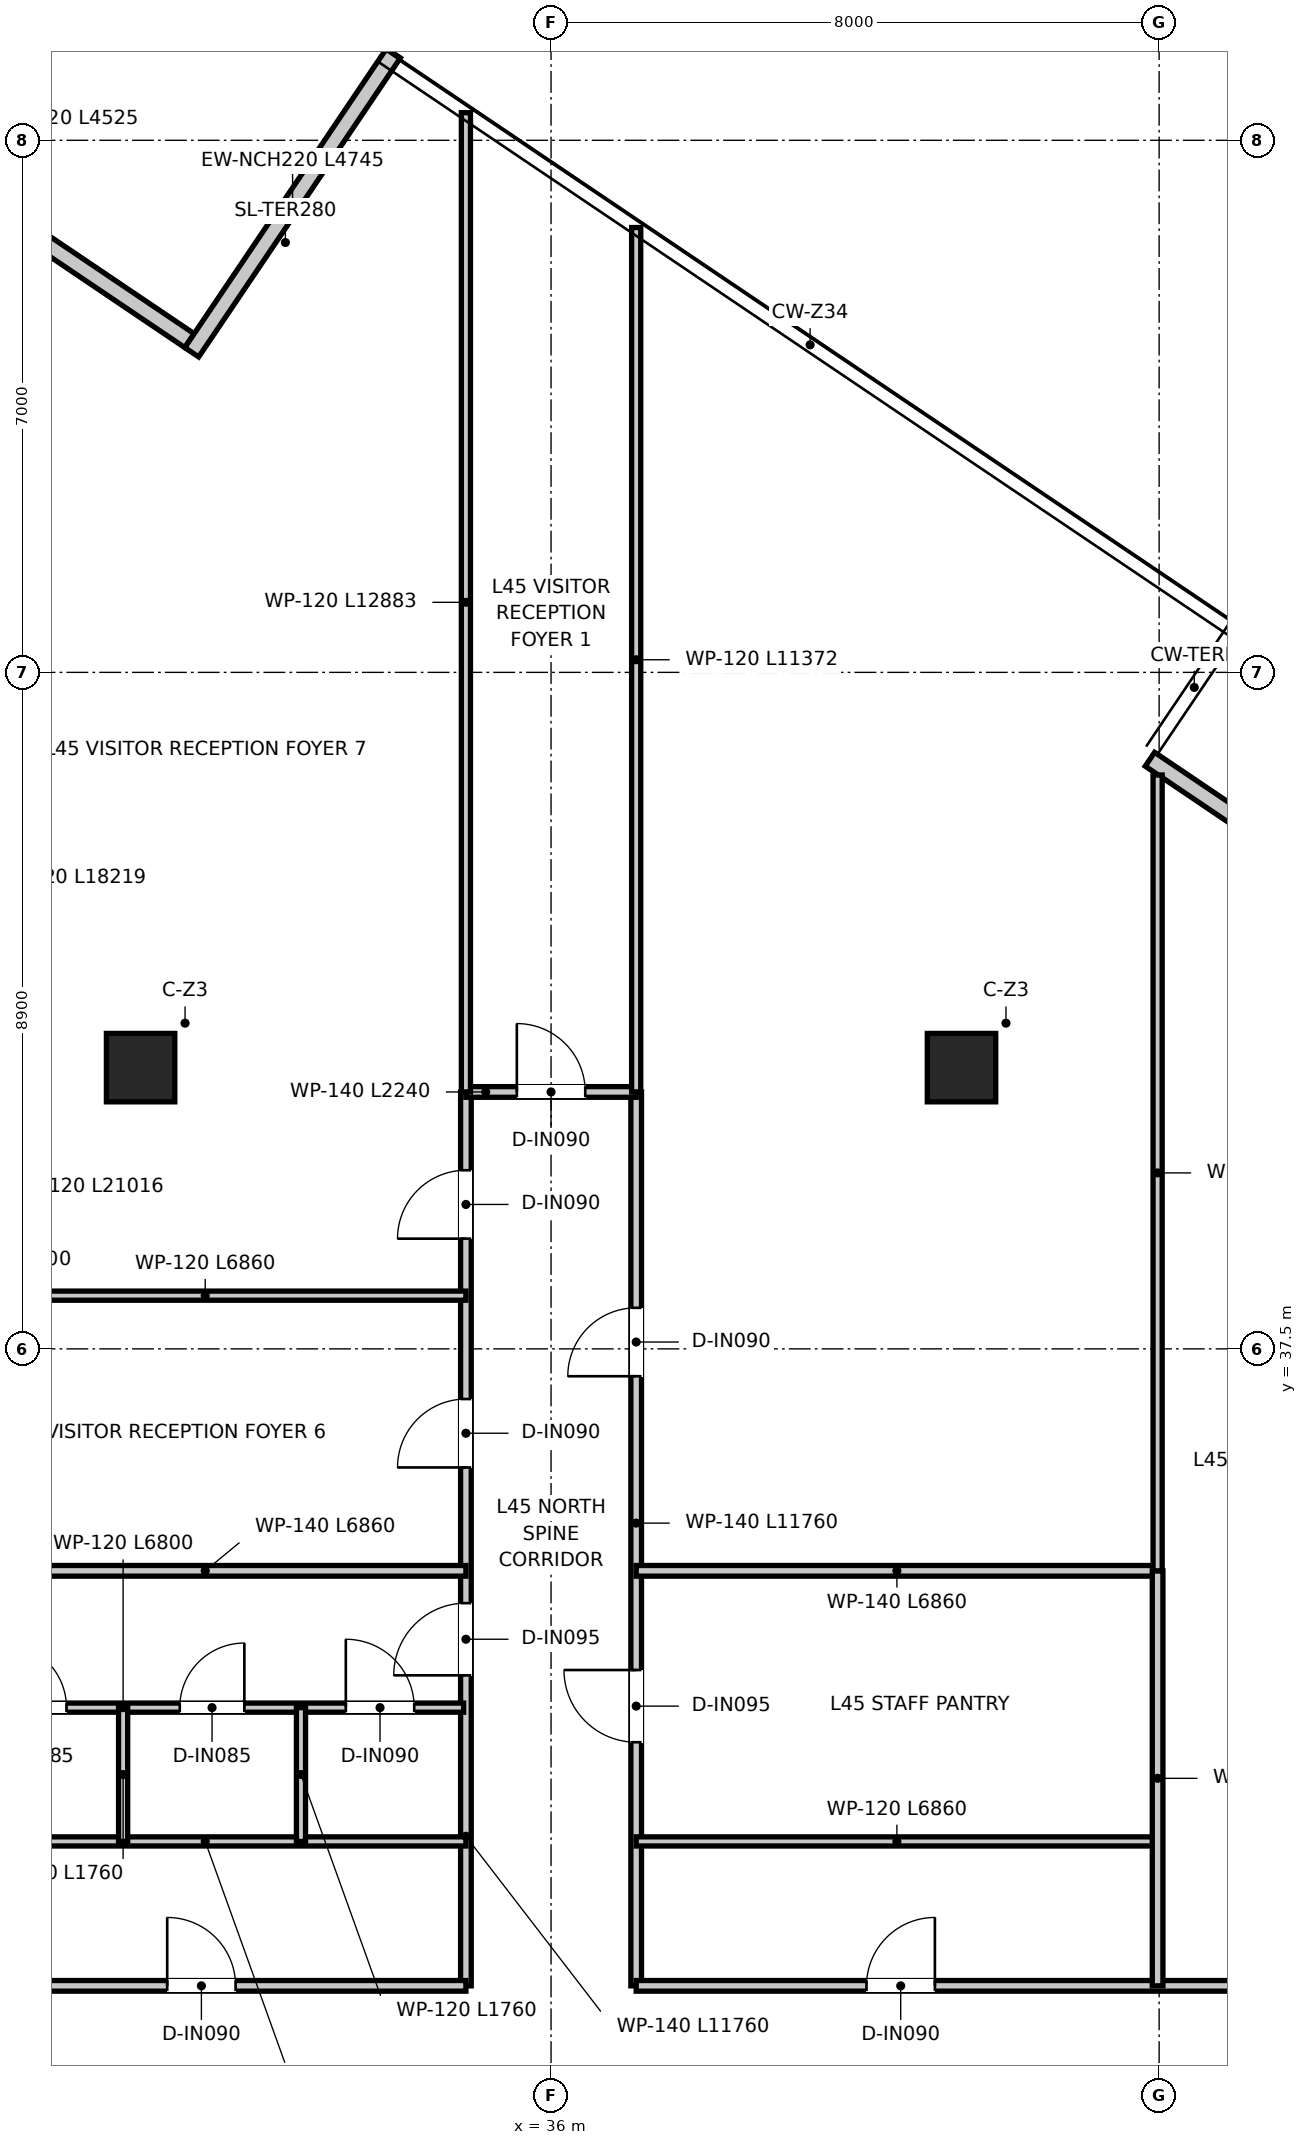
"""IFC4 building model, lengths in metres.
Left out: names, types, materials, properties, quantities, classifications, styles, units other than length and angle.
Written with IfcOpenShell. Run it as: python <this file> out.ifc"""

import sys

from ifc_helpers import new_model, si_unit, direction, frame, frame_2d, origin, origin_2d, place, context, subcontext, project, spatial, rectangle, extrude, source, transform, mapped, element, fill, save


model = new_model("IFC4")
c1 = context("Model", 3, precision=1e-05, world=origin(), true_north=direction((0.0, 1.0)))
c2 = subcontext(c1, "Body", "Model", "MODEL_VIEW")
j1 = project(units=[si_unit("LENGTHUNIT", "METRE"), si_unit("PLANEANGLEUNIT", "RADIAN")], contexts=[c1])
p1 = place(None, origin())
s1 = spatial("IfcSite", under=j1, at=p1, CompositionType="ELEMENT")
p2 = place(p1, origin())
s2 = spatial("IfcBuilding", under=s1, at=p2, CompositionType="ELEMENT")
p3 = place(p2, frame((0.0, 0.0, 185.7)))
s3 = spatial("IfcBuildingStorey", under=s2, at=p3, CompositionType="ELEMENT", Elevation=185.7)
m1 = source(origin(), c2, "Body", "SweptSolid", [
    extrude(rectangle(XDim=0.9, YDim=0.9, at=origin_2d()), origin(), (0.0, 0.0, 1.0), 3.95),
])
for number, where, z_axis, x_axis in (
    (1, (30.6, 41.2, 0.0), (0.0, 0.0, 1.0), (1.0, 0.0, 0.0)),
    (2, (41.4, 41.2, 0.0), (0.0, 0.0, 1.0), (1.0, 0.0, 0.0)),
):
    element("IfcColumn", number, at=place(p3, frame(where, z_axis=z_axis, x_axis=x_axis)), inside=s3, PredefinedType="COLUMN", context=c2, shape_type="MappedRepresentation", body=[
        mapped(m1, transform((0.0, 0.0, 0.0), x_axis=(1.0, 0.0, 0.0), y_axis=(0.0, 1.0, 0.0), z_axis=(0.0, 0.0, 1.0), scale=1.0)),
    ])
p4 = place(p3, frame((31.243, 50.764, 0.0), z_axis=(0.0, 0.0, 1.0), x_axis=(-0.829025013232, 0.559211522982, 0.0)))
e3 = element("IfcWall", 3, at=p4, inside=s3, PredefinedType="ELEMENTEDWALL", context=c2, shape_type="SweptSolid", body=[
    extrude(rectangle(XDim=4.525, YDim=0.22, at=frame_2d((2.263, 0.0))), origin(), (0.0, 0.0, 1.0), 3.67),
])
p5 = place(p3, frame((43.879, 45.257, 0.0), z_axis=(0.0, 0.0, 1.0), x_axis=(0.829039271094, -0.559190385274, 0.0)))
e4 = element("IfcWall", 4, at=p5, inside=s3, PredefinedType="ELEMENTEDWALL", context=c2, shape_type="SweptSolid", body=[
    extrude(rectangle(XDim=7.69, YDim=0.22, at=frame_2d((3.845, 0.0))), origin(), (0.0, 0.0, 1.0), 3.67),
])
p6 = place(p5, frame((2.397, 0.0, 0.0)))
e5 = element("IfcOpeningElement", 5, at=p6, cuts=e4, PredefinedType="OPENING", context=c2, shape_type="SweptSolid", body=[
    extrude(rectangle(XDim=0.95, YDim=2.1, at=frame_2d((0.475, 1.05))), frame((0.0, 0.12, 0.0), z_axis=(0.0, -1.0, 0.0), x_axis=(1.0, 0.0, 0.0)), (0.0, 0.0, 1.0), 0.24),
])
p7 = place(p3, frame((33.926, 54.545, 0.0), z_axis=(0.0, 0.0, 1.0), x_axis=(-0.559180323614, -0.829046057637, 0.0)))
e6 = element("IfcWall", 6, at=p7, inside=s3, PredefinedType="ELEMENTEDWALL", context=c2, shape_type="SweptSolid", body=[
    extrude(rectangle(XDim=4.745, YDim=0.22, at=frame_2d((2.373, 0.0))), origin(), (0.0, 0.0, 1.0), 3.67),
])
p8 = place(p3, frame((34.88, 29.12, 0.0), z_axis=(0.0, 0.0, 1.0), x_axis=(0.0, 1.0, 0.0)))
e7 = element("IfcWall", 7, at=p8, inside=s3, PredefinedType="PARTITIONING", context=c2, shape_type="SweptSolid", body=[
    extrude(rectangle(XDim=11.76, YDim=0.14, at=frame_2d((5.88, 0.0))), origin(), (0.0, 0.0, 1.0), 3.03),
])
p9 = place(p8, frame((4.085, 0.0, 0.0)))
e8 = element("IfcOpeningElement", 8, at=p9, cuts=e7, PredefinedType="OPENING", context=c2, shape_type="SweptSolid", body=[
    extrude(rectangle(XDim=0.95, YDim=2.1, at=frame_2d((0.475, 1.05))), frame((0.0, 0.08, 0.0), z_axis=(0.0, -1.0, 0.0), x_axis=(1.0, 0.0, 0.0)), (0.0, 0.0, 1.0), 0.16),
])
p10 = place(p8, frame((6.82, 0.0, 0.0)))
e9 = element("IfcOpeningElement", 9, at=p10, cuts=e7, PredefinedType="OPENING", context=c2, shape_type="SweptSolid", body=[
    extrude(rectangle(XDim=0.9, YDim=2.1, at=frame_2d((0.45, 1.05))), frame((0.0, 0.08, 0.0), z_axis=(0.0, -1.0, 0.0), x_axis=(1.0, 0.0, 0.0)), (0.0, 0.0, 1.0), 0.16),
])
p11 = place(p8, frame((9.83, 0.0, 0.0)))
e10 = element("IfcOpeningElement", 10, at=p11, cuts=e7, PredefinedType="OPENING", context=c2, shape_type="SweptSolid", body=[
    extrude(rectangle(XDim=0.9, YDim=2.1, at=frame_2d((0.45, 1.05))), frame((0.0, 0.08, 0.0), z_axis=(0.0, -1.0, 0.0), x_axis=(1.0, 0.0, 0.0)), (0.0, 0.0, 1.0), 0.16),
])
p12 = place(p3, frame((37.12, 29.12, 0.0), z_axis=(0.0, 0.0, 1.0), x_axis=(0.0, 1.0, 0.0)))
e11 = element("IfcWall", 11, at=p12, inside=s3, PredefinedType="PARTITIONING", context=c2, shape_type="SweptSolid", body=[
    extrude(rectangle(XDim=11.76, YDim=0.14, at=frame_2d((5.88, 0.0))), origin(), (0.0, 0.0, 1.0), 3.03),
])
p13 = place(p12, frame((3.205, 0.0, 0.0)))
e12 = element("IfcOpeningElement", 12, at=p13, cuts=e11, PredefinedType="OPENING", context=c2, shape_type="SweptSolid", body=[
    extrude(rectangle(XDim=0.95, YDim=2.1, at=frame_2d((0.475, 1.05))), frame((0.0, 0.08, 0.0), z_axis=(0.0, -1.0, 0.0), x_axis=(1.0, 0.0, 0.0)), (0.0, 0.0, 1.0), 0.16),
])
p14 = place(p12, frame((8.02, 0.0, 0.0)))
e13 = element("IfcOpeningElement", 13, at=p14, cuts=e11, PredefinedType="OPENING", context=c2, shape_type="SweptSolid", body=[
    extrude(rectangle(XDim=0.9, YDim=2.1, at=frame_2d((0.45, 1.05))), frame((0.0, 0.08, 0.0), z_axis=(0.0, -1.0, 0.0), x_axis=(1.0, 0.0, 0.0)), (0.0, 0.0, 1.0), 0.16),
])
p15 = place(p3, frame((34.88, 40.88, 0.0), z_axis=(0.0, 0.0, 1.0), x_axis=(1.0, 0.0, 0.0)))
e14 = element("IfcWall", 14, at=p15, inside=s3, PredefinedType="PARTITIONING", context=c2, shape_type="SweptSolid", body=[
    extrude(rectangle(XDim=2.24, YDim=0.14, at=frame_2d((1.12, 0.0))), origin(), (0.0, 0.0, 1.0), 3.67),
])
p16 = place(p15, frame((0.67, 0.0, 0.0)))
e15 = element("IfcOpeningElement", 15, at=p16, cuts=e14, PredefinedType="OPENING", context=c2, shape_type="SweptSolid", body=[
    extrude(rectangle(XDim=0.9, YDim=2.1, at=frame_2d((0.45, 1.05))), frame((0.0, 0.08, 0.0), z_axis=(0.0, -1.0, 0.0), x_axis=(1.0, 0.0, 0.0)), (0.0, 0.0, 1.0), 0.16),
])
p17 = place(p3, frame((11.325, 29.12, 0.0), z_axis=(0.0, 0.0, 1.0), x_axis=(1.0, 0.0, 0.0)))
e16 = element("IfcWall", 16, at=p17, inside=s3, PredefinedType="PARTITIONING", context=c2, shape_type="SweptSolid", body=[
    extrude(rectangle(XDim=23.555, YDim=0.14, at=frame_2d((11.778, 0.0))), origin(), (0.0, 0.0, 1.0), 3.03),
])
p18 = place(p17, frame((19.625, 0.0, 0.0)))
e17 = element("IfcOpeningElement", 17, at=p18, cuts=e16, PredefinedType="OPENING", context=c2, shape_type="SweptSolid", body=[
    extrude(rectangle(XDim=0.9, YDim=2.1, at=frame_2d((0.45, 1.05))), frame((0.0, 0.08, 0.0), z_axis=(0.0, -1.0, 0.0), x_axis=(1.0, 0.0, 0.0)), (0.0, 0.0, 1.0), 0.16),
])
p19 = place(p17, frame((2.835, 0.0, 0.0)))
e18 = element("IfcOpeningElement", 18, at=p19, cuts=e16, PredefinedType="OPENING", context=c2, shape_type="SweptSolid", body=[
    extrude(rectangle(XDim=0.9, YDim=2.1, at=frame_2d((0.45, 1.05))), frame((0.0, 0.08, 0.0), z_axis=(0.0, -1.0, 0.0), x_axis=(1.0, 0.0, 0.0)), (0.0, 0.0, 1.0), 0.16),
])
p20 = place(p17, frame((9.725, 0.0, 0.0)))
e19 = element("IfcOpeningElement", 19, at=p20, cuts=e16, PredefinedType="OPENING", context=c2, shape_type="SweptSolid", body=[
    extrude(rectangle(XDim=0.9, YDim=2.1, at=frame_2d((0.45, 1.05))), frame((0.0, 0.08, 0.0), z_axis=(0.0, -1.0, 0.0), x_axis=(1.0, 0.0, 0.0)), (0.0, 0.0, 1.0), 0.16),
])
p21 = place(p17, frame((12.475, 0.0, 0.0)))
e20 = element("IfcOpeningElement", 20, at=p21, cuts=e16, PredefinedType="OPENING", context=c2, shape_type="SweptSolid", body=[
    extrude(rectangle(XDim=0.9, YDim=2.1, at=frame_2d((0.45, 1.05))), frame((0.0, 0.08, 0.0), z_axis=(0.0, -1.0, 0.0), x_axis=(1.0, 0.0, 0.0)), (0.0, 0.0, 1.0), 0.16),
])
p22 = place(p17, frame((14.775, 0.0, 0.0)))
e21 = element("IfcOpeningElement", 21, at=p22, cuts=e16, PredefinedType="OPENING", context=c2, shape_type="SweptSolid", body=[
    extrude(rectangle(XDim=0.9, YDim=2.1, at=frame_2d((0.45, 1.05))), frame((0.0, 0.08, 0.0), z_axis=(0.0, -1.0, 0.0), x_axis=(1.0, 0.0, 0.0)), (0.0, 0.0, 1.0), 0.16),
])
p23 = place(p3, frame((37.12, 29.12, 0.0), z_axis=(0.0, 0.0, 1.0), x_axis=(1.0, 0.0, 0.0)))
e22 = element("IfcWall", 22, at=p23, inside=s3, PredefinedType="PARTITIONING", context=c2, shape_type="SweptSolid", body=[
    extrude(rectangle(XDim=26.006, YDim=0.14, at=frame_2d((13.003, 0.0))), origin(), (0.0, 0.0, 1.0), 3.03),
])
p24 = place(p23, frame((3.03, 0.0, 0.0)))
e23 = element("IfcOpeningElement", 23, at=p24, cuts=e22, PredefinedType="OPENING", context=c2, shape_type="SweptSolid", body=[
    extrude(rectangle(XDim=0.9, YDim=2.1, at=frame_2d((0.45, 1.05))), frame((0.0, 0.08, 0.0), z_axis=(0.0, -1.0, 0.0), x_axis=(1.0, 0.0, 0.0)), (0.0, 0.0, 1.0), 0.16),
])
p25 = place(p23, frame((8.42, 0.0, 0.0)))
e24 = element("IfcOpeningElement", 24, at=p25, cuts=e22, PredefinedType="OPENING", context=c2, shape_type="SweptSolid", body=[
    extrude(rectangle(XDim=0.9, YDim=2.1, at=frame_2d((0.45, 1.05))), frame((0.0, 0.08, 0.0), z_axis=(0.0, -1.0, 0.0), x_axis=(1.0, 0.0, 0.0)), (0.0, 0.0, 1.0), 0.16),
])
p26 = place(p23, frame((11.93, 0.0, 0.0)))
e25 = element("IfcOpeningElement", 25, at=p26, cuts=e22, PredefinedType="OPENING", context=c2, shape_type="SweptSolid", body=[
    extrude(rectangle(XDim=0.9, YDim=2.1, at=frame_2d((0.45, 1.05))), frame((0.0, 0.08, 0.0), z_axis=(0.0, -1.0, 0.0), x_axis=(1.0, 0.0, 0.0)), (0.0, 0.0, 1.0), 0.16),
])
p27 = place(p23, frame((19.32, 0.0, 0.0)))
e26 = element("IfcOpeningElement", 26, at=p27, cuts=e22, PredefinedType="OPENING", context=c2, shape_type="SweptSolid", body=[
    extrude(rectangle(XDim=0.9, YDim=2.1, at=frame_2d((0.45, 1.05))), frame((0.0, 0.08, 0.0), z_axis=(0.0, -1.0, 0.0), x_axis=(1.0, 0.0, 0.0)), (0.0, 0.0, 1.0), 0.16),
])
for number, where, z_axis, x_axis in (
    (27, (28.02, 31.02, 0.0), (0.0, 0.0, 1.0), (1.0, 0.0, 0.0)),
    (28, (37.12, 31.02, 0.0), (0.0, 0.0, 1.0), (1.0, 0.0, 0.0)),
):
    element("IfcWall", number, at=place(p3, frame(where, z_axis=z_axis, x_axis=x_axis)), inside=s3, PredefinedType="PARTITIONING", context=c2, shape_type="SweptSolid", body=[
        extrude(rectangle(XDim=6.86, YDim=0.12, at=frame_2d((3.43, 0.0))), origin(), (0.0, 0.0, 1.0), 3.08),
    ])
for number, where, z_axis, x_axis in (
    (29, (28.02, 34.58, 0.0), (0.0, 0.0, 1.0), (1.0, 0.0, 0.0)),
    (30, (37.12, 34.58, 0.0), (0.0, 0.0, 1.0), (1.0, 0.0, 0.0)),
):
    element("IfcWall", number, at=place(p3, frame(where, z_axis=z_axis, x_axis=x_axis)), inside=s3, PredefinedType="PARTITIONING", context=c2, shape_type="SweptSolid", body=[
        extrude(rectangle(XDim=6.86, YDim=0.14, at=frame_2d((3.43, 0.0))), origin(), (0.0, 0.0, 1.0), 3.08),
    ])
p28 = place(p3, frame((43.98, 29.12, 0.0), z_axis=(0.0, 0.0, 1.0), x_axis=(0.0, 1.0, 0.0)))
e31 = element("IfcWall", 31, at=p28, inside=s3, PredefinedType="PARTITIONING", context=c2, shape_type="SweptSolid", body=[
    extrude(rectangle(XDim=5.46, YDim=0.14, at=frame_2d((2.73, 0.0))), origin(), (0.0, 0.0, 1.0), 3.31),
])
p29 = place(p3, frame((28.05, 32.78, 0.0), z_axis=(0.0, 0.0, 1.0), x_axis=(1.0, 0.0, 0.0)))
e32 = element("IfcWall", 32, at=p29, inside=s3, PredefinedType="PARTITIONING", context=c2, shape_type="SweptSolid", body=[
    extrude(rectangle(XDim=6.8, YDim=0.12, at=frame_2d((3.4, 0.0))), origin(), (0.0, 0.0, 1.0), 3.08),
])
p30 = place(p29, frame((0.725, 0.0, 0.0)))
e33 = element("IfcOpeningElement", 33, at=p30, cuts=e32, PredefinedType="OPENING", context=c2, shape_type="SweptSolid", body=[
    extrude(rectangle(XDim=0.85, YDim=2.1, at=frame_2d((0.425, 1.05))), frame((0.0, 0.07, 0.0), z_axis=(0.0, -1.0, 0.0), x_axis=(1.0, 0.0, 0.0)), (0.0, 0.0, 1.0), 0.14),
])
p31 = place(p29, frame((3.065, 0.0, 0.0)))
e34 = element("IfcOpeningElement", 34, at=p31, cuts=e32, PredefinedType="OPENING", context=c2, shape_type="SweptSolid", body=[
    extrude(rectangle(XDim=0.85, YDim=2.1, at=frame_2d((0.425, 1.05))), frame((0.0, 0.07, 0.0), z_axis=(0.0, -1.0, 0.0), x_axis=(1.0, 0.0, 0.0)), (0.0, 0.0, 1.0), 0.14),
])
p32 = place(p29, frame((5.25, 0.0, 0.0)))
e35 = element("IfcOpeningElement", 35, at=p32, cuts=e32, PredefinedType="OPENING", context=c2, shape_type="SweptSolid", body=[
    extrude(rectangle(XDim=0.9, YDim=2.1, at=frame_2d((0.45, 1.05))), frame((0.0, 0.07, 0.0), z_axis=(0.0, -1.0, 0.0), x_axis=(1.0, 0.0, 0.0)), (0.0, 0.0, 1.0), 0.14),
])
p33 = place(p3, frame((30.37, 31.02, 0.0), z_axis=(0.0, 0.0, 1.0), x_axis=(0.0, 1.0, 0.0)))
e36 = element("IfcWall", 36, at=p33, inside=s3, PredefinedType="PARTITIONING", context=c2, shape_type="SweptSolid", body=[
    extrude(rectangle(XDim=1.76, YDim=0.12, at=frame_2d((0.88, 0.0))), origin(), (0.0, 0.0, 1.0), 3.08),
])
p34 = place(p3, frame((32.71, 31.02, 0.0), z_axis=(0.0, 0.0, 1.0), x_axis=(0.0, 1.0, 0.0)))
e37 = element("IfcWall", 37, at=p34, inside=s3, PredefinedType="PARTITIONING", context=c2, shape_type="SweptSolid", body=[
    extrude(rectangle(XDim=1.76, YDim=0.12, at=frame_2d((0.88, 0.0))), origin(), (0.0, 0.0, 1.0), 3.67),
])
p35 = place(p3, frame((34.88, 40.88, 0.0), z_axis=(0.0, 0.0, 1.0), x_axis=(0.0, 1.0, 0.0)))
e38 = element("IfcWall", 38, at=p35, inside=s3, PredefinedType="PARTITIONING", context=c2, shape_type="SweptSolid", body=[
    extrude(rectangle(XDim=12.883, YDim=0.12, at=frame_2d((6.442, 0.0))), origin(), (0.0, 0.0, 1.0), 3.28),
])
p36 = place(p3, frame((37.12, 40.88, 0.0), z_axis=(0.0, 0.0, 1.0), x_axis=(0.0, 1.0, 0.0)))
e39 = element("IfcWall", 39, at=p36, inside=s3, PredefinedType="PARTITIONING", context=c2, shape_type="SweptSolid", body=[
    extrude(rectangle(XDim=11.372, YDim=0.12, at=frame_2d((5.686, 0.0))), origin(), (0.0, 0.0, 1.0), 3.28),
])
p37 = place(p3, frame((43.98, 34.58, 0.0), z_axis=(0.0, 0.0, 1.0), x_axis=(0.0, 1.0, 0.0)))
e40 = element("IfcWall", 40, at=p37, inside=s3, PredefinedType="PARTITIONING", context=c2, shape_type="SweptSolid", body=[
    extrude(rectangle(XDim=10.47, YDim=0.12, at=frame_2d((5.235, 0.0))), origin(), (0.0, 0.0, 1.0), 3.03),
])
p38 = place(p3, frame((28.02, 38.2, 0.0), z_axis=(0.0, 0.0, 1.0), x_axis=(1.0, 0.0, 0.0)))
e41 = element("IfcWall", 41, at=p38, inside=s3, PredefinedType="PARTITIONING", context=c2, shape_type="SweptSolid", body=[
    extrude(rectangle(XDim=6.86, YDim=0.12, at=frame_2d((3.43, 0.0))), origin(), (0.0, 0.0, 1.0), 3.08),
])
p39 = place(p18, origin())
e42 = element("IfcDoor", 42, at=p39, inside=s3, OperationType="SINGLE_SWING_LEFT", PredefinedType="DOOR", context=c2, shape_type="SweptSolid", body=[
    extrude(rectangle(XDim=0.9, YDim=2.1, at=frame_2d((0.45, 1.05))), frame((0.0, 0.025, 0.0), z_axis=(0.0, -1.0, 0.0), x_axis=(1.0, 0.0, 0.0)), (0.0, 0.0, 1.0), 0.05),
])
fill(e17, e42)
p40 = place(p24, origin())
e43 = element("IfcDoor", 43, at=p40, inside=s3, OperationType="SINGLE_SWING_RIGHT", PredefinedType="DOOR", context=c2, shape_type="SweptSolid", body=[
    extrude(rectangle(XDim=0.9, YDim=2.1, at=frame_2d((0.45, 1.05))), frame((0.0, 0.025, 0.0), z_axis=(0.0, -1.0, 0.0), x_axis=(1.0, 0.0, 0.0)), (0.0, 0.0, 1.0), 0.05),
])
fill(e23, e43)
p41 = place(p9, origin())
e44 = element("IfcDoor", 44, at=p41, inside=s3, OperationType="SINGLE_SWING_LEFT", PredefinedType="DOOR", context=c2, shape_type="SweptSolid", body=[
    extrude(rectangle(XDim=0.95, YDim=2.1, at=frame_2d((0.475, 1.05))), frame((0.0, 0.025, 0.0), z_axis=(0.0, -1.0, 0.0), x_axis=(1.0, 0.0, 0.0)), (0.0, 0.0, 1.0), 0.05),
])
fill(e8, e44)
p42 = place(p13, origin())
e45 = element("IfcDoor", 45, at=p42, inside=s3, OperationType="SINGLE_SWING_RIGHT", PredefinedType="DOOR", context=c2, shape_type="SweptSolid", body=[
    extrude(rectangle(XDim=0.95, YDim=2.1, at=frame_2d((0.475, 1.05))), frame((0.0, 0.025, 0.0), z_axis=(0.0, -1.0, 0.0), x_axis=(1.0, 0.0, 0.0)), (0.0, 0.0, 1.0), 0.05),
])
fill(e12, e45)
p43 = place(p30, origin())
e46 = element("IfcDoor", 46, at=p43, inside=s3, OperationType="SINGLE_SWING_LEFT", PredefinedType="DOOR", context=c2, shape_type="SweptSolid", body=[
    extrude(rectangle(XDim=0.85, YDim=2.1, at=frame_2d((0.425, 1.05))), frame((0.0, 0.025, 0.0), z_axis=(0.0, -1.0, 0.0), x_axis=(1.0, 0.0, 0.0)), (0.0, 0.0, 1.0), 0.05),
])
fill(e33, e46)
p44 = place(p31, origin())
e47 = element("IfcDoor", 47, at=p44, inside=s3, OperationType="SINGLE_SWING_RIGHT", PredefinedType="DOOR", context=c2, shape_type="SweptSolid", body=[
    extrude(rectangle(XDim=0.85, YDim=2.1, at=frame_2d((0.425, 1.05))), frame((0.0, 0.025, 0.0), z_axis=(0.0, -1.0, 0.0), x_axis=(1.0, 0.0, 0.0)), (0.0, 0.0, 1.0), 0.05),
])
fill(e34, e47)
p45 = place(p32, origin())
e48 = element("IfcDoor", 48, at=p45, inside=s3, OperationType="SINGLE_SWING_LEFT", PredefinedType="DOOR", context=c2, shape_type="SweptSolid", body=[
    extrude(rectangle(XDim=0.9, YDim=2.1, at=frame_2d((0.45, 1.05))), frame((0.0, 0.025, 0.0), z_axis=(0.0, -1.0, 0.0), x_axis=(1.0, 0.0, 0.0)), (0.0, 0.0, 1.0), 0.05),
])
fill(e35, e48)
p46 = place(p16, origin())
e49 = element("IfcDoor", 49, at=p46, inside=s3, OperationType="SINGLE_SWING_LEFT", PredefinedType="DOOR", context=c2, shape_type="SweptSolid", body=[
    extrude(rectangle(XDim=0.9, YDim=2.1, at=frame_2d((0.45, 1.05))), frame((0.0, 0.025, 0.0), z_axis=(0.0, -1.0, 0.0), x_axis=(1.0, 0.0, 0.0)), (0.0, 0.0, 1.0), 0.05),
])
fill(e15, e49)
p47 = place(p10, origin())
e50 = element("IfcDoor", 50, at=p47, inside=s3, OperationType="SINGLE_SWING_LEFT", PredefinedType="DOOR", context=c2, shape_type="SweptSolid", body=[
    extrude(rectangle(XDim=0.9, YDim=2.1, at=frame_2d((0.45, 1.05))), frame((0.0, 0.025, 0.0), z_axis=(0.0, -1.0, 0.0), x_axis=(1.0, 0.0, 0.0)), (0.0, 0.0, 1.0), 0.05),
])
fill(e9, e50)
p48 = place(p11, origin())
e51 = element("IfcDoor", 51, at=p48, inside=s3, OperationType="SINGLE_SWING_LEFT", PredefinedType="DOOR", context=c2, shape_type="SweptSolid", body=[
    extrude(rectangle(XDim=0.9, YDim=2.1, at=frame_2d((0.45, 1.05))), frame((0.0, 0.025, 0.0), z_axis=(0.0, -1.0, 0.0), x_axis=(1.0, 0.0, 0.0)), (0.0, 0.0, 1.0), 0.05),
])
fill(e10, e51)
p49 = place(p14, origin())
e52 = element("IfcDoor", 52, at=p49, inside=s3, OperationType="SINGLE_SWING_LEFT", PredefinedType="DOOR", context=c2, shape_type="SweptSolid", body=[
    extrude(rectangle(XDim=0.9, YDim=2.1, at=frame_2d((0.45, 1.05))), frame((0.0, 0.025, 0.0), z_axis=(0.0, -1.0, 0.0), x_axis=(1.0, 0.0, 0.0)), (0.0, 0.0, 1.0), 0.05),
])
fill(e13, e52)
save(model, sys.argv[1])
